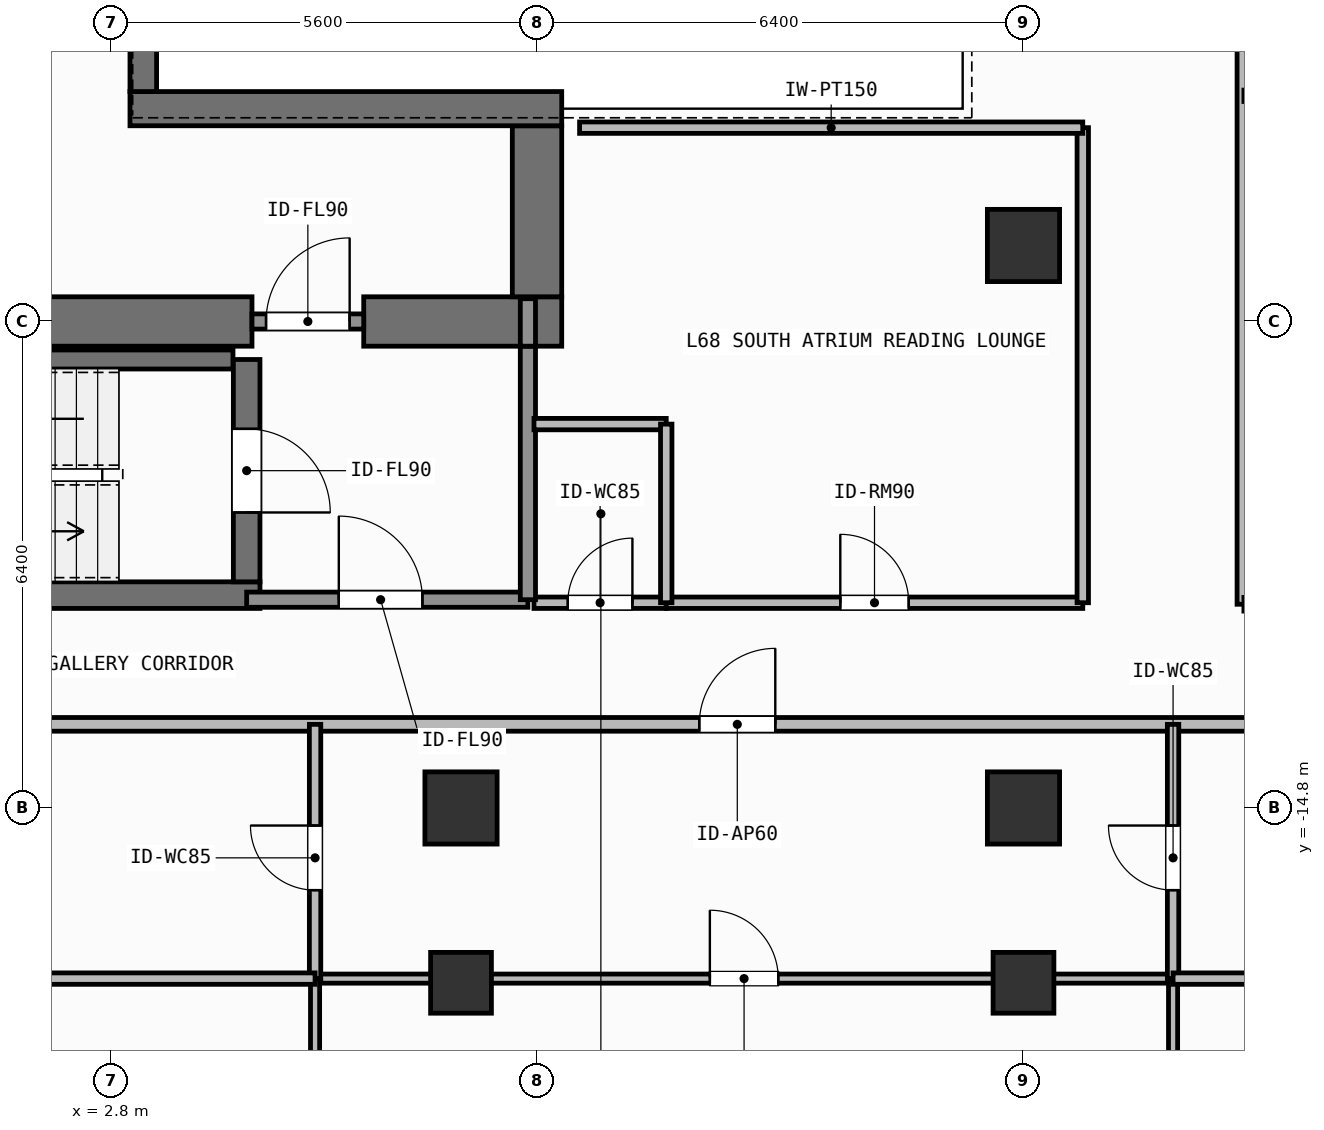
"""IFC4 building model, lengths in metres.
Left out: names, types, materials, properties, quantities, classifications, styles, units other than length and angle.
Written with IfcOpenShell. Run it as: python <this file> out.ifc"""

import sys

from ifc_helpers import new_model, si_unit, direction, frame, frame_2d, origin, origin_2d, place, context, subcontext, project, spatial, rectangle, hollow_rectangle, extrude, element, fill, save


model = new_model("IFC4")
c1 = context("Model", 3, precision=1e-05, world=origin(), true_north=direction((0.0, 1.0)))
c2 = subcontext(c1, "Body", "Model", "MODEL_VIEW")
j1 = project(units=[si_unit("LENGTHUNIT", "METRE"), si_unit("PLANEANGLEUNIT", "RADIAN")], contexts=[c1])
p1 = place(None, origin())
s1 = spatial("IfcSite", under=j1, at=p1, CompositionType="ELEMENT")
p2 = place(p1, origin())
s2 = spatial("IfcBuilding", under=s1, at=p2, CompositionType="ELEMENT")
p3 = place(p2, frame((0.0, 0.0, 278.1)))
s3 = spatial("IfcBuildingStorey", under=s2, at=p3, CompositionType="ELEMENT", Elevation=278.1)
p4 = place(p3, frame((-2.62, -8.4, 0.0), z_axis=(0.0, 0.0, 1.0), x_axis=(1.0, 0.0, 0.0)))
e1 = element("IfcWall", 1, at=p4, inside=s3, PredefinedType="SHEAR", context=c2, shape_type="SweptSolid", body=[
    extrude(rectangle(XDim=7.27, YDim=0.65, at=frame_2d((3.635, 0.0))), origin(), (0.0, 0.0, 1.0), 3.9),
])
p5 = place(p3, frame((6.12, -8.4, 0.0), z_axis=(0.0, 0.0, 1.0), x_axis=(1.0, 0.0, 0.0)))
e2 = element("IfcWall", 2, at=p5, inside=s3, PredefinedType="SHEAR", context=c2, shape_type="SweptSolid", body=[
    extrude(rectangle(XDim=2.605, YDim=0.65, at=frame_2d((1.302, 0.0))), origin(), (0.0, 0.0, 1.0), 3.9),
])
p6 = place(p3, frame((8.4, -8.075, 0.0), z_axis=(0.0, 0.0, 1.0), x_axis=(0.0, 1.0, 0.0)))
e3 = element("IfcWall", 3, at=p6, inside=s3, PredefinedType="SHEAR", context=c2, shape_type="SweptSolid", body=[
    extrude(rectangle(XDim=2.25, YDim=0.65, at=frame_2d((1.125, 0.0))), origin(), (0.0, 0.0, 1.0), 3.9),
])
p7 = place(p3, frame((3.045, -5.6, 0.0), z_axis=(0.0, 0.0, 1.0), x_axis=(1.0, 0.0, 0.0)))
e4 = element("IfcWall", 4, at=p7, inside=s3, PredefinedType="SHEAR", context=c2, shape_type="SweptSolid", body=[
    extrude(rectangle(XDim=5.68, YDim=0.45, at=frame_2d((2.84, 0.0))), origin(), (0.0, 0.0, 1.0), 3.9),
])
p8 = place(p3, frame((3.22, -5.375, 0.0), z_axis=(0.0, 0.0, 1.0), x_axis=(0.0, 1.0, 0.0)))
e5 = element("IfcWall", 5, at=p8, inside=s3, PredefinedType="SHEAR", context=c2, shape_type="SweptSolid", body=[
    extrude(rectangle(XDim=10.75, YDim=0.35, at=frame_2d((5.375, 0.0))), origin(), (0.0, 0.0, 1.0), 3.9),
])
p9 = place(p3, frame((-2.555, -12.0, 0.0), z_axis=(0.0, 0.0, 1.0), x_axis=(1.0, 0.0, 0.0)))
e6 = element("IfcWall", 6, at=p9, inside=s3, PredefinedType="SHEAR", context=c2, shape_type="SweptSolid", body=[
    extrude(rectangle(XDim=7.31, YDim=0.35, at=frame_2d((3.655, 0.0))), origin(), (0.0, 0.0, 1.0), 3.9),
])
p10 = place(p3, frame((-2.2, -8.9, 0.0), z_axis=(0.0, 0.0, 1.0), x_axis=(1.0, 0.0, 0.0)))
e7 = element("IfcWall", 7, at=p10, inside=s3, PredefinedType="SHEAR", context=c2, shape_type="SweptSolid", body=[
    extrude(rectangle(XDim=6.6, YDim=0.25, at=frame_2d((3.3, 0.0))), origin(), (0.0, 0.0, 1.0), 3.9),
])
p11 = place(p3, frame((4.58, -8.9, 0.0), z_axis=(0.0, 0.0, 1.0), x_axis=(0.0, -1.0, 0.0)))
e8 = element("IfcWall", 8, at=p11, inside=s3, PredefinedType="SHEAR", context=c2, shape_type="SweptSolid", body=[
    extrude(rectangle(XDim=2.925, YDim=0.35, at=frame_2d((1.462, 0.0))), origin(), (0.0, 0.0, 1.0), 3.9),
])
p12 = place(p11, frame((0.913, 0.0, 0.0)))
e9 = element("IfcOpeningElement", 9, at=p12, cuts=e8, PredefinedType="OPENING", context=c2, shape_type="SweptSolid", body=[
    extrude(rectangle(XDim=1.1, YDim=2.15, at=frame_2d((0.55, 1.075))), frame((0.0, 0.185, 0.0), z_axis=(0.0, -1.0, 0.0), x_axis=(1.0, 0.0, 0.0)), (0.0, 0.0, 1.0), 0.37),
])
for number, where, z_axis, x_axis in (
    (10, (7.4, -14.8, 0.0), (0.0, 0.0, 1.0), (1.0, 0.0, 0.0)),
    (11, (14.8, -14.8, 0.0), (0.0, 0.0, 1.0), (1.0, 0.0, 0.0)),
    (12, (14.8, -7.4, 0.0), (0.0, 0.0, 1.0), (1.0, 0.0, 0.0)),
):
    element("IfcColumn", number, at=place(p3, frame(where, z_axis=z_axis, x_axis=x_axis)), inside=s3, PredefinedType="COLUMN", context=c2, shape_type="SweptSolid", body=[
        extrude(rectangle(XDim=0.95, YDim=0.95, at=origin_2d()), origin(), (0.0, 0.0, 1.0), 3.9),
    ])
for number, where, z_axis, x_axis in (
    (13, (7.4, -17.1, 0.0), (0.0, 0.0, 1.0), (1.0, 0.0, 0.0)),
    (14, (14.8, -17.1, 0.0), (0.0, 0.0, 1.0), (1.0, 0.0, 0.0)),
):
    element("IfcColumn", number, at=place(p3, frame(where, z_axis=z_axis, x_axis=x_axis)), inside=s3, PredefinedType="COLUMN", context=c2, shape_type="SweptSolid", body=[
        extrude(hollow_rectangle(XDim=0.8, YDim=0.8, WallThickness=0.036, at=origin_2d()), origin(), (0.0, 0.0, 1.0), 3.9),
    ])
p13 = place(p3, frame((4.58, -12.06, 0.0), z_axis=(0.0, 0.0, 1.0), x_axis=(1.0, 0.0, 0.0)))
e15 = element("IfcWall", 15, at=p13, inside=s3, PredefinedType="SOLIDWALL", context=c2, shape_type="SweptSolid", body=[
    extrude(rectangle(XDim=3.7, YDim=0.2, at=frame_2d((1.85, 0.0))), origin(), (0.0, 0.0, 1.0), 3.68),
])
p14 = place(p13, frame((1.212, 0.0, 0.0)))
e16 = element("IfcOpeningElement", 16, at=p14, cuts=e15, PredefinedType="OPENING", context=c2, shape_type="SweptSolid", body=[
    extrude(rectangle(XDim=1.1, YDim=2.15, at=frame_2d((0.55, 1.075))), frame((0.0, 0.11, 0.0), z_axis=(0.0, -1.0, 0.0), x_axis=(1.0, 0.0, 0.0)), (0.0, 0.0, 1.0), 0.22),
])
p15 = place(p3, frame((4.65, -8.4, 0.0), z_axis=(0.0, 0.0, 1.0), x_axis=(1.0, 0.0, 0.0)))
e17 = element("IfcWall", 17, at=p15, inside=s3, PredefinedType="SOLIDWALL", context=c2, shape_type="SweptSolid", body=[
    extrude(rectangle(XDim=1.47, YDim=0.2, at=frame_2d((0.735, 0.0))), origin(), (0.0, 0.0, 1.0), 2.92),
])
p16 = place(p15, frame((0.185, 0.0, 0.0)))
e18 = element("IfcOpeningElement", 18, at=p16, cuts=e17, PredefinedType="OPENING", context=c2, shape_type="SweptSolid", body=[
    extrude(rectangle(XDim=1.1, YDim=2.15, at=frame_2d((0.55, 1.075))), frame((0.0, 0.11, 0.0), z_axis=(0.0, -1.0, 0.0), x_axis=(1.0, 0.0, 0.0)), (0.0, 0.0, 1.0), 0.22),
])
p17 = place(p3, frame((8.36, -12.1, 0.0), z_axis=(0.0, 0.0, 1.0), x_axis=(1.0, 0.0, 0.0)))
e19 = element("IfcWall", 19, at=p17, inside=s3, PredefinedType="PARTITIONING", context=c2, shape_type="SweptSolid", body=[
    extrude(rectangle(XDim=1.74, YDim=0.15, at=frame_2d((0.87, 0.0))), origin(), (0.0, 0.0, 1.0), 3.68),
])
p18 = place(p17, frame((0.445, 0.0, 0.0)))
e20 = element("IfcOpeningElement", 20, at=p18, cuts=e19, PredefinedType="OPENING", context=c2, shape_type="SweptSolid", body=[
    extrude(rectangle(XDim=0.85, YDim=2.1, at=frame_2d((0.425, 1.05))), frame((0.0, 0.085, 0.0), z_axis=(0.0, -1.0, 0.0), x_axis=(1.0, 0.0, 0.0)), (0.0, 0.0, 1.0), 0.17),
])
p19 = place(p3, frame((10.1, -12.1, 0.0), z_axis=(0.0, 0.0, 1.0), x_axis=(1.0, 0.0, 0.0)))
e21 = element("IfcWall", 21, at=p19, inside=s3, PredefinedType="PARTITIONING", context=c2, shape_type="SweptSolid", body=[
    extrude(rectangle(XDim=5.48, YDim=0.15, at=frame_2d((2.74, 0.0))), origin(), (0.0, 0.0, 1.0), 3.68),
])
p20 = place(p19, frame((2.29, 0.0, 0.0)))
e22 = element("IfcOpeningElement", 22, at=p20, cuts=e21, PredefinedType="OPENING", context=c2, shape_type="SweptSolid", body=[
    extrude(rectangle(XDim=0.9, YDim=2.1, at=frame_2d((0.45, 1.05))), frame((0.0, 0.085, 0.0), z_axis=(0.0, -1.0, 0.0), x_axis=(1.0, 0.0, 0.0)), (0.0, 0.0, 1.0), 0.17),
])
p21 = place(p3, frame((0.728, -13.7, 0.0), z_axis=(0.0, 0.0, 1.0), x_axis=(1.0, 0.0, 0.0)))
e23 = element("IfcWall", 23, at=p21, inside=s3, PredefinedType="PARTITIONING", context=c2, shape_type="SweptSolid", body=[
    extrude(rectangle(XDim=20.792, YDim=0.18, at=frame_2d((10.396, 0.0))), origin(), (0.0, 0.0, 1.0), 3.68),
])
p22 = place(p21, frame((9.807, 0.0, 0.0)))
e24 = element("IfcOpeningElement", 24, at=p22, cuts=e23, PredefinedType="OPENING", context=c2, shape_type="SweptSolid", body=[
    extrude(rectangle(XDim=1.0, YDim=2.2, at=frame_2d((0.5, 1.1))), frame((0.0, 0.1, 0.0), z_axis=(0.0, -1.0, 0.0), x_axis=(1.0, 0.0, 0.0)), (0.0, 0.0, 1.0), 0.2),
])
p23 = place(p3, frame((5.48, -17.045, 0.0), z_axis=(0.0, 0.0, 1.0), x_axis=(1.0, 0.0, 0.0)))
e25 = element("IfcWall", 25, at=p23, inside=s3, PredefinedType="PARTITIONING", context=c2, shape_type="SweptSolid", body=[
    extrude(rectangle(XDim=11.288, YDim=0.12, at=frame_2d((5.644, 0.0))), origin(), (0.0, 0.0, 1.0), 3.182),
])
p24 = place(p23, frame((5.194, 0.0, 0.0)))
e26 = element("IfcOpeningElement", 26, at=p24, cuts=e25, PredefinedType="OPENING", context=c2, shape_type="SweptSolid", body=[
    extrude(rectangle(XDim=0.9, YDim=2.1, at=frame_2d((0.45, 1.05))), frame((0.0, 0.07, 0.0), z_axis=(0.0, -1.0, 0.0), x_axis=(1.0, 0.0, 0.0)), (0.0, 0.0, 1.0), 0.14),
])
p25 = place(p3, frame((5.48, -17.045, 0.0), z_axis=(0.0, 0.0, 1.0), x_axis=(0.0, 1.0, 0.0)))
e27 = element("IfcWall", 27, at=p25, inside=s3, PredefinedType="PARTITIONING", context=c2, shape_type="SweptSolid", body=[
    extrude(rectangle(XDim=3.345, YDim=0.15, at=frame_2d((1.672, 0.0))), origin(), (0.0, 0.0, 1.0), 3.68),
])
p26 = place(p25, frame((1.164, 0.0, 0.0)))
e28 = element("IfcOpeningElement", 28, at=p26, cuts=e27, PredefinedType="OPENING", context=c2, shape_type="SweptSolid", body=[
    extrude(rectangle(XDim=0.85, YDim=2.1, at=frame_2d((0.425, 1.05))), frame((0.0, 0.085, 0.0), z_axis=(0.0, -1.0, 0.0), x_axis=(1.0, 0.0, 0.0)), (0.0, 0.0, 1.0), 0.17),
])
p27 = place(p3, frame((5.48, -20.63, 0.0), z_axis=(0.0, 0.0, 1.0), x_axis=(0.0, 1.0, 0.0)))
e29 = element("IfcWall", 29, at=p27, inside=s3, PredefinedType="PARTITIONING", context=c2, shape_type="SweptSolid", body=[
    extrude(rectangle(XDim=3.585, YDim=0.12, at=frame_2d((1.792, 0.0))), origin(), (0.0, 0.0, 1.0), 3.68),
])
p28 = place(p27, frame((1.343, 0.0, 0.0)))
e30 = element("IfcOpeningElement", 30, at=p28, cuts=e29, PredefinedType="OPENING", context=c2, shape_type="SweptSolid", body=[
    extrude(rectangle(XDim=0.9, YDim=2.1, at=frame_2d((0.45, 1.05))), frame((0.0, 0.07, 0.0), z_axis=(0.0, -1.0, 0.0), x_axis=(1.0, 0.0, 0.0)), (0.0, 0.0, 1.0), 0.14),
])
p29 = place(p3, frame((16.768, -17.045, 0.0), z_axis=(0.0, 0.0, 1.0), x_axis=(0.0, 1.0, 0.0)))
e31 = element("IfcWall", 31, at=p29, inside=s3, PredefinedType="PARTITIONING", context=c2, shape_type="SweptSolid", body=[
    extrude(rectangle(XDim=3.345, YDim=0.15, at=frame_2d((1.672, 0.0))), origin(), (0.0, 0.0, 1.0), 3.68),
])
p30 = place(p29, frame((1.164, 0.0, 0.0)))
e32 = element("IfcOpeningElement", 32, at=p30, cuts=e31, PredefinedType="OPENING", context=c2, shape_type="SweptSolid", body=[
    extrude(rectangle(XDim=0.85, YDim=2.1, at=frame_2d((0.425, 1.05))), frame((0.0, 0.085, 0.0), z_axis=(0.0, -1.0, 0.0), x_axis=(1.0, 0.0, 0.0)), (0.0, 0.0, 1.0), 0.17),
])
p31 = place(p3, frame((16.768, -20.63, 0.0), z_axis=(0.0, 0.0, 1.0), x_axis=(0.0, 1.0, 0.0)))
e33 = element("IfcWall", 33, at=p31, inside=s3, PredefinedType="PARTITIONING", context=c2, shape_type="SweptSolid", body=[
    extrude(rectangle(XDim=3.585, YDim=0.12, at=frame_2d((1.792, 0.0))), origin(), (0.0, 0.0, 1.0), 3.68),
])
p32 = place(p31, frame((1.343, 0.0, 0.0)))
e34 = element("IfcOpeningElement", 34, at=p32, cuts=e33, PredefinedType="OPENING", context=c2, shape_type="SweptSolid", body=[
    extrude(rectangle(XDim=0.9, YDim=2.1, at=frame_2d((0.45, 1.05))), frame((0.0, 0.07, 0.0), z_axis=(0.0, -1.0, 0.0), x_axis=(1.0, 0.0, 0.0)), (0.0, 0.0, 1.0), 0.14),
])
p33 = place(p3, frame((17.7, -12.12, 0.0), z_axis=(0.0, 0.0, 1.0), x_axis=(0.0, 1.0, 0.0)))
e35 = element("IfcWall", 35, at=p33, inside=s3, PredefinedType="PARTITIONING", context=c2, shape_type="SweptSolid", body=[
    extrude(rectangle(XDim=24.24, YDim=0.18, at=frame_2d((12.12, 0.0))), origin(), (0.0, 0.0, 1.0), 3.68),
])
p34 = place(p33, frame((11.62, 0.0, 0.0)))
e36 = element("IfcOpeningElement", 36, at=p34, cuts=e35, PredefinedType="OPENING", context=c2, shape_type="SweptSolid", body=[
    extrude(rectangle(XDim=1.0, YDim=2.2, at=frame_2d((0.5, 1.1))), frame((0.0, 0.1, 0.0), z_axis=(0.0, -1.0, 0.0), x_axis=(1.0, 0.0, 0.0)), (0.0, 0.0, 1.0), 0.2),
])
p35 = place(p3, frame((17.7, -5.431, 0.0), z_axis=(0.0, 0.0, 1.0), x_axis=(1.0, 0.0, 0.0)))
e37 = element("IfcWall", 37, at=p35, inside=s3, PredefinedType="PARTITIONING", context=c2, shape_type="SweptSolid", body=[
    extrude(rectangle(XDim=3.978, YDim=0.15, at=frame_2d((1.989, 0.0))), origin(), (0.0, 0.0, 1.0), 3.68),
])
p36 = place(p35, frame((1.915, 0.0, 0.0)))
e38 = element("IfcOpeningElement", 38, at=p36, cuts=e37, PredefinedType="OPENING", context=c2, shape_type="SweptSolid", body=[
    extrude(rectangle(XDim=0.85, YDim=2.1, at=frame_2d((0.425, 1.05))), frame((0.0, 0.085, 0.0), z_axis=(0.0, -1.0, 0.0), x_axis=(1.0, 0.0, 0.0)), (0.0, 0.0, 1.0), 0.17),
])
p37 = place(p3, frame((8.28, -12.06, 0.0), z_axis=(0.0, 0.0, 1.0), x_axis=(0.0, 1.0, 0.0)))
e39 = element("IfcWall", 39, at=p37, inside=s3, PredefinedType="SOLIDWALL", context=c2, shape_type="SweptSolid", body=[
    extrude(rectangle(XDim=3.335, YDim=0.2, at=frame_2d((1.667, 0.0))), origin(), (0.0, 0.0, 1.0), 3.68),
])
p38 = place(p3, frame((8.28, -8.725, 0.0), z_axis=(0.0, 0.0, 1.0), x_axis=(0.0, 1.0, 0.0)))
e40 = element("IfcWall", 40, at=p38, inside=s3, PredefinedType="SOLIDWALL", context=c2, shape_type="SweptSolid", body=[
    extrude(rectangle(XDim=0.625, YDim=0.2, at=frame_2d((0.312, 0.0))), origin(), (0.0, 0.0, 1.0), 3.68),
])
p39 = place(p3, frame((8.36, -9.75, 0.0), z_axis=(0.0, 0.0, 1.0), x_axis=(1.0, 0.0, 0.0)))
e41 = element("IfcWall", 41, at=p39, inside=s3, PredefinedType="PARTITIONING", context=c2, shape_type="SweptSolid", body=[
    extrude(rectangle(XDim=1.74, YDim=0.15, at=frame_2d((0.87, 0.0))), origin(), (0.0, 0.0, 1.0), 3.68),
])
p40 = place(p3, frame((10.1, -12.1, 0.0), z_axis=(0.0, 0.0, 1.0), x_axis=(0.0, 1.0, 0.0)))
e42 = element("IfcWall", 42, at=p40, inside=s3, PredefinedType="PARTITIONING", context=c2, shape_type="SweptSolid", body=[
    extrude(rectangle(XDim=2.35, YDim=0.15, at=frame_2d((1.175, 0.0))), origin(), (0.0, 0.0, 1.0), 3.68),
])
p41 = place(p3, frame((15.58, -12.1, 0.0), z_axis=(0.0, 0.0, 1.0), x_axis=(0.0, 1.0, 0.0)))
e43 = element("IfcWall", 43, at=p41, inside=s3, PredefinedType="PARTITIONING", context=c2, shape_type="SweptSolid", body=[
    extrude(rectangle(XDim=6.25, YDim=0.15, at=frame_2d((3.125, 0.0))), origin(), (0.0, 0.0, 1.0), 3.68),
])
p42 = place(p3, frame((8.96, -5.85, 0.0), z_axis=(0.0, 0.0, 1.0), x_axis=(1.0, 0.0, 0.0)))
e44 = element("IfcWall", 44, at=p42, inside=s3, PredefinedType="PARTITIONING", context=c2, shape_type="SweptSolid", body=[
    extrude(rectangle(XDim=6.62, YDim=0.15, at=frame_2d((3.31, 0.0))), origin(), (0.0, 0.0, 1.0), 3.68),
])
p43 = place(p3, frame((0.728, -17.045, 0.0), z_axis=(0.0, 0.0, 1.0), x_axis=(1.0, 0.0, 0.0)))
e45 = element("IfcWall", 45, at=p43, inside=s3, PredefinedType="PARTITIONING", context=c2, shape_type="SweptSolid", body=[
    extrude(rectangle(XDim=4.752, YDim=0.15, at=frame_2d((2.376, 0.0))), origin(), (0.0, 0.0, 1.0), 3.182),
])
p44 = place(p3, frame((16.768, -17.045, 0.0), z_axis=(0.0, 0.0, 1.0), x_axis=(1.0, 0.0, 0.0)))
e46 = element("IfcWall", 46, at=p44, inside=s3, PredefinedType="PARTITIONING", context=c2, shape_type="SweptSolid", body=[
    extrude(rectangle(XDim=4.752, YDim=0.15, at=frame_2d((2.376, 0.0))), origin(), (0.0, 0.0, 1.0), 3.68),
])
p45 = place(p3, frame((17.7, -12.12, 0.0), z_axis=(0.0, 0.0, 1.0), x_axis=(1.0, 0.0, 0.0)))
e47 = element("IfcWall", 47, at=p45, inside=s3, PredefinedType="PARTITIONING", context=c2, shape_type="SweptSolid", body=[
    extrude(rectangle(XDim=7.03, YDim=0.18, at=frame_2d((3.515, 0.0))), origin(), (0.0, 0.0, 1.0), 3.68),
])
p46 = place(p12, origin())
e48 = element("IfcDoor", 48, at=p46, inside=s3, OperationType="SINGLE_SWING_RIGHT", PredefinedType="DOOR", context=c2, shape_type="SweptSolid", body=[
    extrude(rectangle(XDim=1.1, YDim=2.15, at=frame_2d((0.55, 1.075))), frame((0.0, 0.025, 0.0), z_axis=(0.0, -1.0, 0.0), x_axis=(1.0, 0.0, 0.0)), (0.0, 0.0, 1.0), 0.05),
])
fill(e9, e48)
p47 = place(p14, origin())
e49 = element("IfcDoor", 49, at=p47, inside=s3, OperationType="SINGLE_SWING_LEFT", PredefinedType="DOOR", context=c2, shape_type="SweptSolid", body=[
    extrude(rectangle(XDim=1.1, YDim=2.15, at=frame_2d((0.55, 1.075))), frame((0.0, 0.025, 0.0), z_axis=(0.0, -1.0, 0.0), x_axis=(1.0, 0.0, 0.0)), (0.0, 0.0, 1.0), 0.05),
])
fill(e16, e49)
p48 = place(p16, origin())
e50 = element("IfcDoor", 50, at=p48, inside=s3, OperationType="SINGLE_SWING_RIGHT", PredefinedType="DOOR", context=c2, shape_type="SweptSolid", body=[
    extrude(rectangle(XDim=1.1, YDim=2.15, at=frame_2d((0.55, 1.075))), frame((0.0, 0.025, 0.0), z_axis=(0.0, -1.0, 0.0), x_axis=(1.0, 0.0, 0.0)), (0.0, 0.0, 1.0), 0.05),
])
fill(e18, e50)
p49 = place(p18, origin())
e51 = element("IfcDoor", 51, at=p49, inside=s3, OperationType="SINGLE_SWING_RIGHT", PredefinedType="DOOR", context=c2, shape_type="SweptSolid", body=[
    extrude(rectangle(XDim=0.85, YDim=2.1, at=frame_2d((0.425, 1.05))), frame((0.0, 0.025, 0.0), z_axis=(0.0, -1.0, 0.0), x_axis=(1.0, 0.0, 0.0)), (0.0, 0.0, 1.0), 0.05),
])
fill(e20, e51)
p50 = place(p20, origin())
e52 = element("IfcDoor", 52, at=p50, inside=s3, OperationType="SINGLE_SWING_LEFT", PredefinedType="DOOR", context=c2, shape_type="SweptSolid", body=[
    extrude(rectangle(XDim=0.9, YDim=2.1, at=frame_2d((0.45, 1.05))), frame((0.0, 0.025, 0.0), z_axis=(0.0, -1.0, 0.0), x_axis=(1.0, 0.0, 0.0)), (0.0, 0.0, 1.0), 0.05),
])
fill(e22, e52)
p51 = place(p22, origin())
e53 = element("IfcDoor", 53, at=p51, inside=s3, OperationType="SINGLE_SWING_RIGHT", PredefinedType="DOOR", context=c2, shape_type="SweptSolid", body=[
    extrude(rectangle(XDim=1.0, YDim=2.2, at=frame_2d((0.5, 1.1))), frame((0.0, 0.025, 0.0), z_axis=(0.0, -1.0, 0.0), x_axis=(1.0, 0.0, 0.0)), (0.0, 0.0, 1.0), 0.05),
])
fill(e24, e53)
p52 = place(p24, origin())
e54 = element("IfcDoor", 54, at=p52, inside=s3, OperationType="SINGLE_SWING_LEFT", PredefinedType="DOOR", context=c2, shape_type="SweptSolid", body=[
    extrude(rectangle(XDim=0.9, YDim=2.1, at=frame_2d((0.45, 1.05))), frame((0.0, 0.025, 0.0), z_axis=(0.0, -1.0, 0.0), x_axis=(1.0, 0.0, 0.0)), (0.0, 0.0, 1.0), 0.05),
])
fill(e26, e54)
p53 = place(p26, origin())
e55 = element("IfcDoor", 55, at=p53, inside=s3, OperationType="SINGLE_SWING_RIGHT", PredefinedType="DOOR", context=c2, shape_type="SweptSolid", body=[
    extrude(rectangle(XDim=0.85, YDim=2.1, at=frame_2d((0.425, 1.05))), frame((0.0, 0.025, 0.0), z_axis=(0.0, -1.0, 0.0), x_axis=(1.0, 0.0, 0.0)), (0.0, 0.0, 1.0), 0.05),
])
fill(e28, e55)
p54 = place(p30, origin())
e56 = element("IfcDoor", 56, at=p54, inside=s3, OperationType="SINGLE_SWING_RIGHT", PredefinedType="DOOR", context=c2, shape_type="SweptSolid", body=[
    extrude(rectangle(XDim=0.85, YDim=2.1, at=frame_2d((0.425, 1.05))), frame((0.0, 0.025, 0.0), z_axis=(0.0, -1.0, 0.0), x_axis=(1.0, 0.0, 0.0)), (0.0, 0.0, 1.0), 0.05),
])
fill(e32, e56)
save(model, sys.argv[1])
